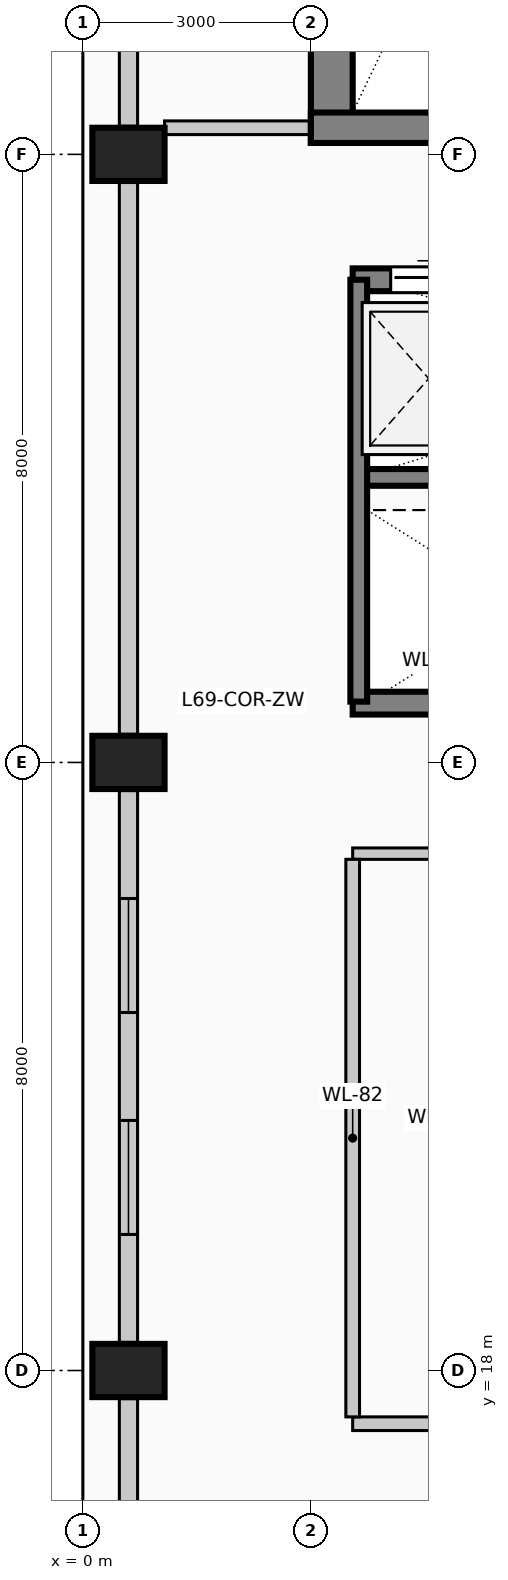
"""IFC4 building model, lengths in metres.
Left out: names, types, materials, properties, quantities, classifications, styles, units other than length and angle.
Written with IfcOpenShell. Run it as: python <this file> out.ifc"""

import sys

from ifc_helpers import new_model, si_unit, direction, frame, frame_2d, origin, origin_2d, place, context, subcontext, project, spatial, rectangle, extrude, element, fill, save


model = new_model("IFC4")
c1 = context("Model", 3, precision=1e-05, world=origin(), true_north=direction((0.0, 1.0)))
c2 = subcontext(c1, "Body", "Model", "MODEL_VIEW")
j1 = project(units=[si_unit("LENGTHUNIT", "METRE"), si_unit("PLANEANGLEUNIT", "RADIAN")], contexts=[c1])
p1 = place(None, origin())
s1 = spatial("IfcSite", under=j1, at=p1, CompositionType="ELEMENT")
p2 = place(p1, origin())
s2 = spatial("IfcBuilding", under=s1, at=p2, CompositionType="ELEMENT")
p3 = place(p2, frame((0.0, 0.0, 285.0)))
s3 = spatial("IfcBuildingStorey", under=s2, at=p3, CompositionType="ELEMENT", Elevation=285.0)
p4 = place(p3, frame((3.275, 34.15, 0.0), z_axis=(0.0, 0.0, 1.0), x_axis=(0.0, 1.0, 0.0)))
e1 = element("IfcWall", 1, at=p4, inside=s3, PredefinedType="SHEAR", context=c2, shape_type="SweptSolid", body=[
    extrude(rectangle(XDim=8.83, YDim=0.55, at=frame_2d((4.415, 0.0))), origin(), (0.0, 0.0, 1.0), 4.0),
])
p5 = place(p3, frame((3.0, 34.35, 0.0), z_axis=(0.0, 0.0, 1.0), x_axis=(1.0, 0.0, 0.0)))
e2 = element("IfcWall", 2, at=p5, inside=s3, PredefinedType="SHEAR", context=c2, shape_type="SweptSolid", body=[
    extrude(rectangle(XDim=4.71, YDim=0.4, at=frame_2d((2.355, 0.0))), origin(), (0.0, 0.0, 1.0), 4.0),
])
p6 = place(p5, frame((2.4, 0.0, 0.0)))
e3 = element("IfcOpeningElement", 3, at=p6, cuts=e2, PredefinedType="OPENING", context=c2, shape_type="SweptSolid", body=[
    extrude(rectangle(XDim=1.15, YDim=2.2, at=frame_2d((0.575, 1.1))), frame((0.0, 0.21, 0.0), z_axis=(0.0, -1.0, 0.0), x_axis=(1.0, 0.0, 0.0)), (0.0, 0.0, 1.0), 0.42),
])
for number, where, z_axis, x_axis in (
    (4, (0.6, 18.0, 0.0), (0.0, 0.0, 1.0), (0.0, 1.0, 0.0)),
    (5, (0.6, 26.0, 0.0), (0.0, 0.0, 1.0), (0.0, 1.0, 0.0)),
    (6, (0.6, 34.0, 0.0), (0.0, 0.0, 1.0), (0.0, 1.0, 0.0)),
):
    element("IfcColumn", number, at=place(p3, frame(where, z_axis=z_axis, x_axis=x_axis)), inside=s3, PredefinedType="COLUMN", context=c2, shape_type="SweptSolid", body=[
        extrude(rectangle(XDim=0.7, YDim=0.95, at=origin_2d()), origin(), (0.0, 0.0, 1.0), 4.0),
    ])
p7 = place(p3, frame((0.6, 10.37, 0.0), z_axis=(0.0, 0.0, 1.0), x_axis=(0.0, 1.0, 0.0)))
e7 = element("IfcWall", 7, at=p7, inside=s3, PredefinedType="SOLIDWALL", context=c2, shape_type="SweptSolid", body=[
    extrude(rectangle(XDim=7.26, YDim=0.24, at=frame_2d((3.63, 0.0))), origin(), (0.0, 0.0, 1.0), 3.025),
])
p8 = place(p7, frame((1.42, 0.0, 0.42)))
e8 = element("IfcOpeningElement", 8, at=p8, cuts=e7, PredefinedType="OPENING", context=c2, shape_type="SweptSolid", body=[
    extrude(rectangle(XDim=1.5, YDim=2.2, at=frame_2d((0.75, 1.1))), frame((0.0, 0.13, 0.0), z_axis=(0.0, -1.0, 0.0), x_axis=(1.0, 0.0, 0.0)), (0.0, 0.0, 1.0), 0.26),
])
p9 = place(p3, frame((0.6, 18.37, 0.0), z_axis=(0.0, 0.0, 1.0), x_axis=(0.0, 1.0, 0.0)))
e9 = element("IfcWall", 9, at=p9, inside=s3, PredefinedType="SOLIDWALL", context=c2, shape_type="SweptSolid", body=[
    extrude(rectangle(XDim=7.26, YDim=0.24, at=frame_2d((3.63, 0.0))), origin(), (0.0, 0.0, 1.0), 3.025),
])
p10 = place(p9, frame((1.42, 0.0, 0.42)))
e10 = element("IfcOpeningElement", 10, at=p10, cuts=e9, PredefinedType="OPENING", context=c2, shape_type="SweptSolid", body=[
    extrude(rectangle(XDim=1.5, YDim=2.2, at=frame_2d((0.75, 1.1))), frame((0.0, 0.13, 0.0), z_axis=(0.0, -1.0, 0.0), x_axis=(1.0, 0.0, 0.0)), (0.0, 0.0, 1.0), 0.26),
])
p11 = place(p9, frame((4.34, 0.0, 0.42)))
e11 = element("IfcOpeningElement", 11, at=p11, cuts=e9, PredefinedType="OPENING", context=c2, shape_type="SweptSolid", body=[
    extrude(rectangle(XDim=1.5, YDim=2.2, at=frame_2d((0.75, 1.1))), frame((0.0, 0.13, 0.0), z_axis=(0.0, -1.0, 0.0), x_axis=(1.0, 0.0, 0.0)), (0.0, 0.0, 1.0), 0.26),
])
p12 = place(p3, frame((0.6, 26.37, 0.0), z_axis=(0.0, 0.0, 1.0), x_axis=(0.0, 1.0, 0.0)))
e12 = element("IfcWall", 12, at=p12, inside=s3, PredefinedType="SOLIDWALL", context=c2, shape_type="SweptSolid", body=[
    extrude(rectangle(XDim=7.26, YDim=0.24, at=frame_2d((3.63, 0.0))), origin(), (0.0, 0.0, 1.0), 3.025),
])
p13 = place(p3, frame((0.6, 34.37, 0.0), z_axis=(0.0, 0.0, 1.0), x_axis=(0.0, 1.0, 0.0)))
e13 = element("IfcWall", 13, at=p13, inside=s3, PredefinedType="SOLIDWALL", context=c2, shape_type="SweptSolid", body=[
    extrude(rectangle(XDim=7.66, YDim=0.24, at=frame_2d((3.83, 0.0))), origin(), (0.0, 0.0, 1.0), 3.025),
])
p14 = place(p3, frame((3.55, 32.35, 0.0), z_axis=(0.0, 0.0, 1.0), x_axis=(1.0, 0.0, 0.0)))
e14 = element("IfcWall", 14, at=p14, inside=s3, PredefinedType="SOLIDWALL", context=c2, shape_type="SweptSolid", body=[
    extrude(rectangle(XDim=2.1, YDim=0.3, at=frame_2d((1.05, 0.0))), origin(), (0.0, 0.0, 1.0), 4.0),
])
p15 = place(p14, frame((0.5, 0.0, 0.0)))
e15 = element("IfcOpeningElement", 15, at=p15, cuts=e14, PredefinedType="OPENING", context=c2, shape_type="SweptSolid", body=[
    extrude(rectangle(XDim=1.1, YDim=2.2, at=frame_2d((0.55, 1.1))), frame((0.0, 0.16, 0.0), z_axis=(0.0, -1.0, 0.0), x_axis=(1.0, 0.0, 0.0)), (0.0, 0.0, 1.0), 0.32),
])
p16 = place(p3, frame((5.65, 26.78, 0.0), z_axis=(0.0, 0.0, 1.0), x_axis=(-1.0, 0.0, 0.0)))
e16 = element("IfcWall", 16, at=p16, inside=s3, PredefinedType="SOLIDWALL", context=c2, shape_type="SweptSolid", body=[
    extrude(rectangle(XDim=2.1, YDim=0.3, at=frame_2d((1.05, 0.0))), origin(), (0.0, 0.0, 1.0), 4.0),
])
p17 = place(p3, frame((3.55, 29.75, 0.0), z_axis=(0.0, 0.0, 1.0), x_axis=(1.0, 0.0, 0.0)))
e17 = element("IfcWall", 17, at=p17, inside=s3, PredefinedType="SOLIDWALL", context=c2, shape_type="SweptSolid", body=[
    extrude(rectangle(XDim=8.65, YDim=0.22, at=frame_2d((4.325, 0.0))), origin(), (0.0, 0.0, 1.0), 4.0),
])
p18 = place(p3, frame((3.63, 26.8, 0.0), z_axis=(0.0, 0.0, 1.0), x_axis=(0.0, 1.0, 0.0)))
e18 = element("IfcWall", 18, at=p18, inside=s3, PredefinedType="SOLIDWALL", context=c2, shape_type="SweptSolid", body=[
    extrude(rectangle(XDim=5.55, YDim=0.22, at=frame_2d((2.775, 0.0))), origin(), (0.0, 0.0, 1.0), 4.0),
])
p19 = place(p3, frame((3.55, 17.3, 0.0), z_axis=(0.0, 0.0, 1.0), x_axis=(1.0, 0.0, 0.0)))
e19 = element("IfcWall", 19, at=p19, inside=s3, PredefinedType="PARTITIONING", context=c2, shape_type="SweptSolid", body=[
    extrude(rectangle(XDim=6.25, YDim=0.18, at=frame_2d((3.125, 0.0))), origin(), (0.0, 0.0, 1.0), 3.775),
])
p20 = place(p19, frame((2.6, 0.0, 0.0)))
e20 = element("IfcOpeningElement", 20, at=p20, cuts=e19, PredefinedType="OPENING", context=c2, shape_type="SweptSolid", body=[
    extrude(rectangle(XDim=1.05, YDim=2.15, at=frame_2d((0.525, 1.075))), frame((0.0, 0.1, 0.0), z_axis=(0.0, -1.0, 0.0), x_axis=(1.0, 0.0, 0.0)), (0.0, 0.0, 1.0), 0.2),
])
p21 = place(p3, frame((3.55, 24.8, 0.0), z_axis=(0.0, 0.0, 1.0), x_axis=(1.0, 0.0, 0.0)))
e21 = element("IfcWall", 21, at=p21, inside=s3, PredefinedType="PARTITIONING", context=c2, shape_type="SweptSolid", body=[
    extrude(rectangle(XDim=6.25, YDim=0.15, at=frame_2d((3.125, 0.0))), origin(), (0.0, 0.0, 1.0), 3.775),
])
p22 = place(p3, frame((1.075, 34.35, 0.0), z_axis=(0.0, 0.0, 1.0), x_axis=(1.0, 0.0, 0.0)))
e22 = element("IfcWall", 22, at=p22, inside=s3, PredefinedType="PARTITIONING", context=c2, shape_type="SweptSolid", body=[
    extrude(rectangle(XDim=1.925, YDim=0.18, at=frame_2d((0.962, 0.0))), origin(), (0.0, 0.0, 1.0), 3.775),
])
p23 = place(p3, frame((3.55, 17.39, 0.0), z_axis=(0.0, 0.0, 1.0), x_axis=(0.0, 1.0, 0.0)))
e23 = element("IfcWall", 23, at=p23, inside=s3, PredefinedType="PARTITIONING", context=c2, shape_type="SweptSolid", body=[
    extrude(rectangle(XDim=7.335, YDim=0.18, at=frame_2d((3.667, 0.0))), origin(), (0.0, 0.0, 1.0), 3.775),
])
p24 = place(p10, origin())
e24 = element("IfcWindow", 24, at=p24, inside=s3, PartitioningType="SINGLE_PANEL", PredefinedType="WINDOW", context=c2, shape_type="SweptSolid", body=[
    extrude(rectangle(XDim=1.5, YDim=2.2, at=frame_2d((0.75, 1.1))), frame((0.0, 0.03, 0.0), z_axis=(0.0, -1.0, 0.0), x_axis=(1.0, 0.0, 0.0)), (0.0, 0.0, 1.0), 0.06),
])
fill(e10, e24)
p25 = place(p11, origin())
e25 = element("IfcWindow", 25, at=p25, inside=s3, PartitioningType="SINGLE_PANEL", PredefinedType="WINDOW", context=c2, shape_type="SweptSolid", body=[
    extrude(rectangle(XDim=1.5, YDim=2.2, at=frame_2d((0.75, 1.1))), frame((0.0, 0.03, 0.0), z_axis=(0.0, -1.0, 0.0), x_axis=(1.0, 0.0, 0.0)), (0.0, 0.0, 1.0), 0.06),
])
fill(e11, e25)
p26 = place(p15, origin())
e26 = element("IfcDoor", 26, at=p26, inside=s3, OperationType="SLIDING_TO_LEFT", PredefinedType="DOOR", context=c2, shape_type="SweptSolid", body=[
    extrude(rectangle(XDim=1.1, YDim=2.2, at=frame_2d((0.55, 1.1))), frame((0.0, 0.025, 0.0), z_axis=(0.0, -1.0, 0.0), x_axis=(1.0, 0.0, 0.0)), (0.0, 0.0, 1.0), 0.05),
])
fill(e15, e26)
save(model, sys.argv[1])
